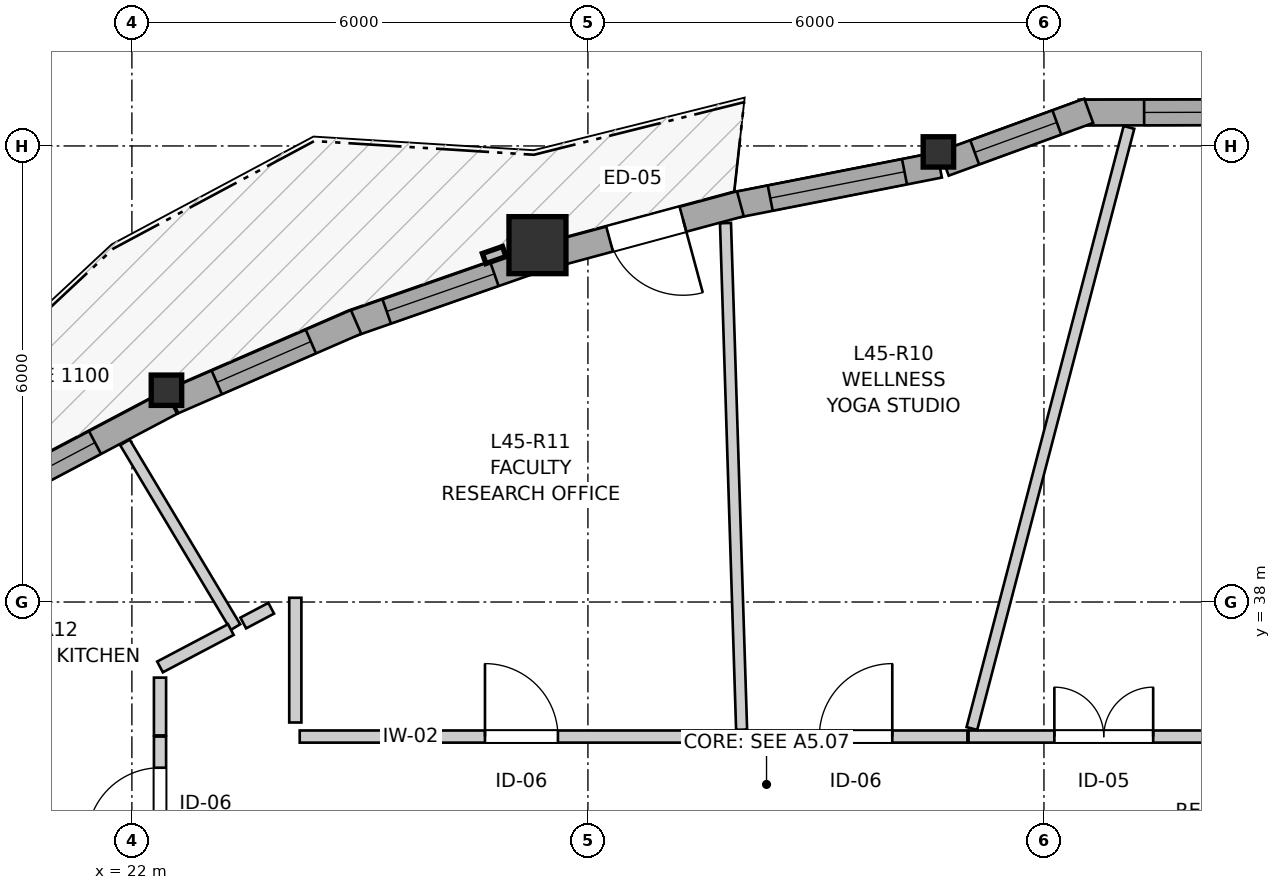
"""IFC4 building model, lengths in metres.
Left out: names, types, materials, properties, quantities, classifications, styles, units other than length and angle.
Written with IfcOpenShell. Run it as: python <this file> out.ifc"""

import sys

from ifc_helpers import new_model, si_unit, direction, frame, frame_2d, origin, origin_2d, place, context, subcontext, project, spatial, rectangle, i_section, extrude, source, transform, mapped, element, fill, save


model = new_model("IFC4")
c1 = context("Model", 3, precision=1e-05, world=origin(), true_north=direction((0.0, 1.0)))
c2 = subcontext(c1, "Body", "Model", "MODEL_VIEW")
j1 = project(units=[si_unit("LENGTHUNIT", "METRE"), si_unit("PLANEANGLEUNIT", "RADIAN")], contexts=[c1])
p1 = place(None, origin())
s1 = spatial("IfcSite", under=j1, at=p1, CompositionType="ELEMENT")
p2 = place(p1, origin())
s2 = spatial("IfcBuilding", under=s1, at=p2, CompositionType="ELEMENT")
p3 = place(p2, frame((0.0, 0.0, 152.2)))
s3 = spatial("IfcBuildingStorey", under=s2, at=p3, CompositionType="ELEMENT", Elevation=152.2)
m1 = source(origin(), c2, "Body", "SweptSolid", [
    extrude(i_section(OverallWidth=0.401, OverallDepth=0.399, WebThickness=0.023, FlangeThickness=0.036, FilletRadius=0.015, at=origin_2d()), origin(), (0.0, 0.0, 1.0), 2.935),
])
p4 = place(p3, frame((32.611, 43.922, 0.0), z_axis=(0.0, 0.0, 1.0), x_axis=(1.0, 0.0, 0.0)))
e1 = element("IfcColumn", 1, at=p4, inside=s3, PredefinedType="PILASTER", context=c2, shape_type="MappedRepresentation", body=[
    mapped(m1, transform((0.0, 0.0, 0.0), x_axis=(1.0, 0.0, 0.0), y_axis=(0.0, 1.0, 0.0), z_axis=(0.0, 0.0, 1.0), scale=1.0)),
])
m2 = source(origin(), c2, "Body", "SweptSolid", [
    extrude(rectangle(XDim=0.75, YDim=0.75, at=origin_2d()), origin(), (0.0, 0.0, 1.0), 2.935),
])
p5 = place(p3, frame((27.336, 42.695, 0.0), z_axis=(0.0, 0.0, 1.0), x_axis=(1.0, 0.0, 0.0)))
e2 = element("IfcColumn", 2, at=p5, inside=s3, PredefinedType="COLUMN", context=c2, shape_type="MappedRepresentation", body=[
    mapped(m2, transform((0.0, 0.0, 0.0), x_axis=(1.0, 0.0, 0.0), y_axis=(0.0, 1.0, 0.0), z_axis=(0.0, 0.0, 1.0), scale=1.0)),
])
p6 = place(p3, frame((22.455, 40.786, 0.0), z_axis=(0.0, 0.0, 1.0), x_axis=(1.0, 0.0, 0.0)))
e3 = element("IfcColumn", 3, at=p6, inside=s3, PredefinedType="PILASTER", context=c2, shape_type="MappedRepresentation", body=[
    mapped(m1, transform((0.0, 0.0, 0.0), x_axis=(1.0, 0.0, 0.0), y_axis=(0.0, 1.0, 0.0), z_axis=(0.0, 0.0, 1.0), scale=1.0)),
])
p7 = place(p3, frame((36.538, 44.444, 0.0), z_axis=(0.0, 0.0, 1.0), x_axis=(-0.999997247411, -0.002346309825, 0.0)))
e4 = element("IfcWall", 4, at=p7, inside=s3, PredefinedType="SOLIDWALL", context=c2, shape_type="SweptSolid", body=[
    extrude(rectangle(XDim=2.081, YDim=0.34, at=frame_2d((1.041, 0.0))), origin(), (0.0, 0.0, 1.0), 2.515),
])
p8 = place(p7, frame((0.271, 0.0, 0.82)))
e5 = element("IfcOpeningElement", 5, at=p8, cuts=e4, PredefinedType="OPENING", context=c2, shape_type="SweptSolid", body=[
    extrude(rectangle(XDim=0.95, YDim=1.35, at=frame_2d((0.475, 0.675))), frame((0.0, 0.18, 0.0), z_axis=(0.0, -1.0, 0.0), x_axis=(1.0, 0.0, 0.0)), (0.0, 0.0, 1.0), 0.36),
])
p9 = place(p3, frame((34.589, 44.462, 0.0), z_axis=(0.0, 0.0, 1.0), x_axis=(-0.939387553708, -0.342857148007, 0.0)))
e6 = element("IfcWall", 6, at=p9, inside=s3, PredefinedType="SOLIDWALL", context=c2, shape_type="SweptSolid", body=[
    extrude(rectangle(XDim=2.023, YDim=0.34, at=frame_2d((1.011, 0.0))), origin(), (0.0, 0.0, 1.0), 2.515),
])
p10 = place(p9, frame((0.447, 0.0, 0.82)))
e7 = element("IfcOpeningElement", 7, at=p10, cuts=e6, PredefinedType="OPENING", context=c2, shape_type="SweptSolid", body=[
    extrude(rectangle(XDim=1.15, YDim=1.2, at=frame_2d((0.575, 0.6))), frame((0.0, 0.18, 0.0), z_axis=(0.0, -1.0, 0.0), x_axis=(1.0, 0.0, 0.0)), (0.0, 0.0, 1.0), 0.36),
])
p11 = place(p3, frame((32.625, 43.751, 0.0), z_axis=(0.0, 0.0, 1.0), x_axis=(-0.981232663103, -0.192827541756, 0.0)))
e8 = element("IfcWall", 8, at=p11, inside=s3, PredefinedType="SOLIDWALL", context=c2, shape_type="SweptSolid", body=[
    extrude(rectangle(XDim=2.756, YDim=0.34, at=frame_2d((1.378, 0.0))), origin(), (0.0, 0.0, 1.0), 2.515),
])
p12 = place(p11, frame((0.468, 0.0, 0.82)))
e9 = element("IfcOpeningElement", 9, at=p12, cuts=e8, PredefinedType="OPENING", context=c2, shape_type="SweptSolid", body=[
    extrude(rectangle(XDim=1.8, YDim=1.45, at=frame_2d((0.9, 0.725))), frame((0.0, 0.18, 0.0), z_axis=(0.0, -1.0, 0.0), x_axis=(1.0, 0.0, 0.0)), (0.0, 0.0, 1.0), 0.36),
])
p13 = place(p3, frame((30.006, 43.24, 0.0), z_axis=(0.0, 0.0, 1.0), x_axis=(-0.965448248334, -0.260594857563, 0.0)))
e10 = element("IfcWall", 10, at=p13, inside=s3, PredefinedType="SOLIDWALL", context=c2, shape_type="SweptSolid", body=[
    extrude(rectangle(XDim=2.564, YDim=0.34, at=frame_2d((1.282, 0.0))), origin(), (0.0, 0.0, 1.0), 2.515),
])
p14 = place(p13, frame((0.782, 0.0, 0.0)))
e11 = element("IfcOpeningElement", 11, at=p14, cuts=e10, PredefinedType="OPENING", context=c2, shape_type="SweptSolid", body=[
    extrude(rectangle(XDim=1.0, YDim=2.1, at=frame_2d((0.5, 1.05))), frame((0.0, 0.18, 0.0), z_axis=(0.0, -1.0, 0.0), x_axis=(1.0, 0.0, 0.0)), (0.0, 0.0, 1.0), 0.36),
])
p15 = place(p3, frame((27.246, 42.483, 0.0), z_axis=(0.0, 0.0, 1.0), x_axis=(-0.944132901201, -0.32956496305, 0.0)))
e12 = element("IfcWall", 12, at=p15, inside=s3, PredefinedType="SOLIDWALL", context=c2, shape_type="SweptSolid", body=[
    extrude(rectangle(XDim=2.52, YDim=0.34, at=frame_2d((1.26, 0.0))), origin(), (0.0, 0.0, 1.0), 2.515),
])
p16 = place(p15, frame((0.505, 0.0, 0.82)))
e13 = element("IfcOpeningElement", 13, at=p16, cuts=e12, PredefinedType="OPENING", context=c2, shape_type="SweptSolid", body=[
    extrude(rectangle(XDim=1.5, YDim=1.45, at=frame_2d((0.75, 0.725))), frame((0.0, 0.18, 0.0), z_axis=(0.0, -1.0, 0.0), x_axis=(1.0, 0.0, 0.0)), (0.0, 0.0, 1.0), 0.36),
])
p17 = place(p3, frame((24.949, 41.685, 0.0), z_axis=(0.0, 0.0, 1.0), x_axis=(-0.917112921707, -0.398627506373, 0.0)))
e14 = element("IfcWall", 14, at=p17, inside=s3, PredefinedType="SOLIDWALL", context=c2, shape_type="SweptSolid", body=[
    extrude(rectangle(XDim=2.625, YDim=0.34, at=frame_2d((1.313, 0.0))), origin(), (0.0, 0.0, 1.0), 2.515),
])
p18 = place(p17, frame((0.648, 0.0, 0.82)))
e15 = element("IfcOpeningElement", 15, at=p18, cuts=e14, PredefinedType="OPENING", context=c2, shape_type="SweptSolid", body=[
    extrude(rectangle(XDim=1.35, YDim=1.45, at=frame_2d((0.675, 0.725))), frame((0.0, 0.18, 0.0), z_axis=(0.0, -1.0, 0.0), x_axis=(1.0, 0.0, 0.0)), (0.0, 0.0, 1.0), 0.36),
])
p19 = place(p3, frame((22.517, 40.627, 0.0), z_axis=(0.0, 0.0, 1.0), x_axis=(-0.884374030812, -0.466778934427, 0.0)))
e16 = element("IfcWall", 16, at=p19, inside=s3, PredefinedType="SOLIDWALL", context=c2, shape_type="SweptSolid", body=[
    extrude(rectangle(XDim=2.611, YDim=0.34, at=frame_2d((1.306, 0.0))), origin(), (0.0, 0.0, 1.0), 2.515),
])
p20 = place(p19, frame((1.133, 0.0, 0.82)))
e17 = element("IfcOpeningElement", 17, at=p20, cuts=e16, PredefinedType="OPENING", context=c2, shape_type="SweptSolid", body=[
    extrude(rectangle(XDim=1.05, YDim=1.45, at=frame_2d((0.525, 0.725))), frame((0.0, 0.18, 0.0), z_axis=(0.0, -1.0, 0.0), x_axis=(1.0, 0.0, 0.0)), (0.0, 0.0, 1.0), 0.36),
])
p21 = place(p3, frame((24.208, 36.23, 0.0), z_axis=(0.0, 0.0, 1.0), x_axis=(1.0, 0.0, 0.0)))
e18 = element("IfcWall", 18, at=p21, inside=s3, PredefinedType="PARTITIONING", context=c2, shape_type="SweptSolid", body=[
    extrude(rectangle(XDim=5.832, YDim=0.16, at=frame_2d((2.916, 0.0))), origin(), (0.0, 0.0, 1.0), 2.935),
])
p22 = place(p21, frame((2.438, 0.0, 0.0)))
e19 = element("IfcOpeningElement", 19, at=p22, cuts=e18, PredefinedType="OPENING", context=c2, shape_type="SweptSolid", body=[
    extrude(rectangle(XDim=0.96, YDim=2.1, at=frame_2d((0.48, 1.05))), frame((0.0, 0.09, 0.0), z_axis=(0.0, -1.0, 0.0), x_axis=(1.0, 0.0, 0.0)), (0.0, 0.0, 1.0), 0.18),
])
p23 = place(p3, frame((33.008, 36.23, 0.0), z_axis=(0.0, 0.0, 1.0), x_axis=(1.0, 0.0, 0.0)))
e20 = element("IfcWall", 20, at=p23, inside=s3, PredefinedType="PARTITIONING", context=c2, shape_type="SweptSolid", body=[
    extrude(rectangle(XDim=3.542, YDim=0.16, at=frame_2d((1.771, 0.0))), origin(), (0.0, 0.0, 1.0), 2.573),
])
p24 = place(p23, frame((1.129, 0.0, 0.0)))
e21 = element("IfcOpeningElement", 21, at=p24, cuts=e20, PredefinedType="OPENING", context=c2, shape_type="SweptSolid", body=[
    extrude(rectangle(XDim=1.3, YDim=2.1, at=frame_2d((0.65, 1.05))), frame((0.0, 0.09, 0.0), z_axis=(0.0, -1.0, 0.0), x_axis=(1.0, 0.0, 0.0)), (0.0, 0.0, 1.0), 0.18),
])
p25 = place(p3, frame((30.055, 36.23, 0.0), z_axis=(0.0, 0.0, 1.0), x_axis=(1.0, 0.0, 0.0)))
e22 = element("IfcWall", 22, at=p25, inside=s3, PredefinedType="PARTITIONING", context=c2, shape_type="SweptSolid", body=[
    extrude(rectangle(XDim=2.938, YDim=0.16, at=frame_2d((1.469, 0.0))), origin(), (0.0, 0.0, 1.0), 2.573),
])
p26 = place(p25, frame((0.99, 0.0, 0.0)))
e23 = element("IfcOpeningElement", 23, at=p26, cuts=e22, PredefinedType="OPENING", context=c2, shape_type="SweptSolid", body=[
    extrude(rectangle(XDim=0.96, YDim=2.1, at=frame_2d((0.48, 1.05))), frame((0.0, 0.09, 0.0), z_axis=(0.0, -1.0, 0.0), x_axis=(1.0, 0.0, 0.0)), (0.0, 0.0, 1.0), 0.18),
])
p27 = place(p3, frame((22.37, 34.45, 0.0), z_axis=(0.0, 0.0, 1.0), x_axis=(0.0, 1.0, 0.0)))
e24 = element("IfcWall", 24, at=p27, inside=s3, PredefinedType="PARTITIONING", context=c2, shape_type="SweptSolid", body=[
    extrude(rectangle(XDim=1.78, YDim=0.16, at=frame_2d((0.89, 0.0))), origin(), (0.0, 0.0, 1.0), 2.935),
])
p28 = place(p27, frame((0.41, 0.0, 0.0)))
e25 = element("IfcOpeningElement", 25, at=p28, cuts=e24, PredefinedType="OPENING", context=c2, shape_type="SweptSolid", body=[
    extrude(rectangle(XDim=0.96, YDim=2.1, at=frame_2d((0.48, 1.05))), frame((0.0, 0.09, 0.0), z_axis=(0.0, -1.0, 0.0), x_axis=(1.0, 0.0, 0.0)), (0.0, 0.0, 1.0), 0.18),
])
p29 = place(p3, frame((33.052, 36.336, 0.0), z_axis=(0.0, 0.0, 1.0), x_axis=(0.252838925964, 0.967508386277, 0.0)))
e26 = element("IfcWall", 26, at=p29, inside=s3, PredefinedType="PARTITIONING", context=c2, shape_type="SweptSolid", body=[
    extrude(rectangle(XDim=8.174, YDim=0.145, at=frame_2d((4.087, 0.0))), origin(), (0.0, 0.0, 1.0), 2.935),
])
p30 = place(p3, frame((29.81, 42.985, 0.0), z_axis=(0.0, 0.0, 1.0), x_axis=(0.031815387529, -0.99949376242, 0.0)))
e27 = element("IfcWall", 27, at=p30, inside=s3, PredefinedType="PARTITIONING", context=c2, shape_type="SweptSolid", body=[
    extrude(rectangle(XDim=6.668, YDim=0.145, at=frame_2d((3.334, 0.0))), origin(), (0.0, 0.0, 1.0), 2.935),
])
p31 = place(p3, frame((17.545, 37.432, 0.0), z_axis=(0.0, 0.0, 1.0), x_axis=(0.745965905636, -0.665984134668, 0.0)))
e28 = element("IfcWall", 28, at=p31, inside=s3, PredefinedType="PARTITIONING", context=c2, shape_type="SweptSolid", body=[
    extrude(rectangle(XDim=6.288, YDim=0.145, at=frame_2d((3.144, 0.0))), origin(), (0.0, 0.0, 1.0), 2.935),
])
p32 = place(p3, frame((21.908, 40.1, 0.0), z_axis=(0.0, 0.0, 1.0), x_axis=(0.513582752497, -0.85804006686, 0.0)))
e29 = element("IfcWall", 29, at=p32, inside=s3, PredefinedType="PARTITIONING", context=c2, shape_type="SweptSolid", body=[
    extrude(rectangle(XDim=2.832, YDim=0.145, at=frame_2d((1.416, 0.0))), origin(), (0.0, 0.0, 1.0), 2.935),
])
p33 = place(p3, frame((24.15, 36.415, 0.0), z_axis=(0.0, 0.0, 1.0), x_axis=(0.0, 1.0, 0.0)))
e30 = element("IfcWall", 30, at=p33, inside=s3, PredefinedType="PARTITIONING", context=c2, shape_type="SweptSolid", body=[
    extrude(rectangle(XDim=1.641, YDim=0.16, at=frame_2d((0.82, 0.0))), origin(), (0.0, 0.0, 1.0), 2.935),
])
p34 = place(p3, frame((22.37, 37.146, 0.0), z_axis=(0.0, 0.0, 1.0), x_axis=(0.884530854714, 0.46648168995, 0.0)))
e31 = element("IfcWall", 31, at=p34, inside=s3, PredefinedType="PARTITIONING", context=c2, shape_type="SweptSolid", body=[
    extrude(rectangle(XDim=1.053, YDim=0.16, at=frame_2d((0.527, 0.0))), origin(), (0.0, 0.0, 1.0), 2.543),
])
p35 = place(p3, frame((22.37, 36.245, 0.0), z_axis=(0.0, 0.0, 1.0), x_axis=(0.0, 1.0, 0.0)))
e32 = element("IfcWall", 32, at=p35, inside=s3, PredefinedType="PARTITIONING", context=c2, shape_type="SweptSolid", body=[
    extrude(rectangle(XDim=0.76, YDim=0.16, at=frame_2d((0.38, 0.0))), origin(), (0.0, 0.0, 1.0), 2.935),
])
p36 = place(p3, frame((23.465, 37.724, 0.0), z_axis=(0.0, 0.0, 1.0), x_axis=(0.884344349775, 0.466835164722, 0.0)))
e33 = element("IfcWall", 33, at=p36, inside=s3, PredefinedType="PARTITIONING", context=c2, shape_type="SweptSolid", body=[
    extrude(rectangle(XDim=0.416, YDim=0.16, at=frame_2d((0.208, 0.0))), origin(), (0.0, 0.0, 1.0), 2.543),
])
m3 = source(origin(), c2, "Body", "SweptSolid", [
    extrude(rectangle(XDim=0.95, YDim=1.35, at=frame_2d((0.475, 0.675))), frame((0.0, 0.03, 0.0), z_axis=(0.0, -1.0, 0.0), x_axis=(1.0, 0.0, 0.0)), (0.0, 0.0, 1.0), 0.06),
])
p37 = place(p8, origin())
e34 = element("IfcWindow", 34, at=p37, inside=s3, PartitioningType="SINGLE_PANEL", PredefinedType="WINDOW", context=c2, shape_type="MappedRepresentation", body=[
    mapped(m3, transform((0.0, 0.0, 0.0), x_axis=(1.0, 0.0, 0.0), y_axis=(0.0, 1.0, 0.0), z_axis=(0.0, 0.0, 1.0), scale=1.0)),
])
fill(e5, e34)
m4 = source(origin(), c2, "Body", "SweptSolid", [
    extrude(rectangle(XDim=1.15, YDim=1.2, at=frame_2d((0.575, 0.6))), frame((0.0, 0.03, 0.0), z_axis=(0.0, -1.0, 0.0), x_axis=(1.0, 0.0, 0.0)), (0.0, 0.0, 1.0), 0.06),
])
p38 = place(p10, origin())
e35 = element("IfcWindow", 35, at=p38, inside=s3, PartitioningType="SINGLE_PANEL", PredefinedType="WINDOW", context=c2, shape_type="MappedRepresentation", body=[
    mapped(m4, transform((0.0, 0.0, 0.0), x_axis=(1.0, 0.0, 0.0), y_axis=(0.0, 1.0, 0.0), z_axis=(0.0, 0.0, 1.0), scale=1.0)),
])
fill(e7, e35)
m5 = source(origin(), c2, "Body", "SweptSolid", [
    extrude(rectangle(XDim=1.8, YDim=1.45, at=frame_2d((0.9, 0.725))), frame((0.0, 0.03, 0.0), z_axis=(0.0, -1.0, 0.0), x_axis=(1.0, 0.0, 0.0)), (0.0, 0.0, 1.0), 0.06),
])
p39 = place(p12, origin())
e36 = element("IfcWindow", 36, at=p39, inside=s3, PartitioningType="SINGLE_PANEL", PredefinedType="WINDOW", context=c2, shape_type="MappedRepresentation", body=[
    mapped(m5, transform((0.0, 0.0, 0.0), x_axis=(1.0, 0.0, 0.0), y_axis=(0.0, 1.0, 0.0), z_axis=(0.0, 0.0, 1.0), scale=1.0)),
])
fill(e9, e36)
m6 = source(origin(), c2, "Body", "SweptSolid", [
    extrude(rectangle(XDim=1.5, YDim=1.45, at=frame_2d((0.75, 0.725))), frame((0.0, 0.03, 0.0), z_axis=(0.0, -1.0, 0.0), x_axis=(1.0, 0.0, 0.0)), (0.0, 0.0, 1.0), 0.06),
])
p40 = place(p16, origin())
e37 = element("IfcWindow", 37, at=p40, inside=s3, PartitioningType="SINGLE_PANEL", PredefinedType="WINDOW", context=c2, shape_type="MappedRepresentation", body=[
    mapped(m6, transform((0.0, 0.0, 0.0), x_axis=(1.0, 0.0, 0.0), y_axis=(0.0, 1.0, 0.0), z_axis=(0.0, 0.0, 1.0), scale=1.0)),
])
fill(e13, e37)
m7 = source(origin(), c2, "Body", "SweptSolid", [
    extrude(rectangle(XDim=1.35, YDim=1.45, at=frame_2d((0.675, 0.725))), frame((0.0, 0.03, 0.0), z_axis=(0.0, -1.0, 0.0), x_axis=(1.0, 0.0, 0.0)), (0.0, 0.0, 1.0), 0.06),
])
p41 = place(p18, origin())
e38 = element("IfcWindow", 38, at=p41, inside=s3, PartitioningType="SINGLE_PANEL", PredefinedType="WINDOW", context=c2, shape_type="MappedRepresentation", body=[
    mapped(m7, transform((0.0, 0.0, 0.0), x_axis=(1.0, 0.0, 0.0), y_axis=(0.0, 1.0, 0.0), z_axis=(0.0, 0.0, 1.0), scale=1.0)),
])
fill(e15, e38)
m8 = source(origin(), c2, "Body", "SweptSolid", [
    extrude(rectangle(XDim=1.05, YDim=1.45, at=frame_2d((0.525, 0.725))), frame((0.0, 0.03, 0.0), z_axis=(0.0, -1.0, 0.0), x_axis=(1.0, 0.0, 0.0)), (0.0, 0.0, 1.0), 0.06),
])
p42 = place(p20, origin())
e39 = element("IfcWindow", 39, at=p42, inside=s3, PartitioningType="SINGLE_PANEL", PredefinedType="WINDOW", context=c2, shape_type="MappedRepresentation", body=[
    mapped(m8, transform((0.0, 0.0, 0.0), x_axis=(1.0, 0.0, 0.0), y_axis=(0.0, 1.0, 0.0), z_axis=(0.0, 0.0, 1.0), scale=1.0)),
])
fill(e17, e39)
m9 = source(origin(), c2, "Body", "SweptSolid", [
    extrude(rectangle(XDim=1.0, YDim=2.1, at=frame_2d((0.5, 1.05))), frame((0.0, 0.025, 0.0), z_axis=(0.0, -1.0, 0.0), x_axis=(1.0, 0.0, 0.0)), (0.0, 0.0, 1.0), 0.05),
])
p43 = place(p14, origin())
e40 = element("IfcDoor", 40, at=p43, inside=s3, OperationType="SINGLE_SWING_LEFT", PredefinedType="DOOR", context=c2, shape_type="MappedRepresentation", body=[
    mapped(m9, transform((0.0, 0.0, 0.0), x_axis=(1.0, 0.0, 0.0), y_axis=(0.0, 1.0, 0.0), z_axis=(0.0, 0.0, 1.0), scale=1.0)),
])
fill(e11, e40)
m10 = source(origin(), c2, "Body", "SweptSolid", [
    extrude(rectangle(XDim=0.96, YDim=2.1, at=frame_2d((0.48, 1.05))), frame((0.0, 0.025, 0.0), z_axis=(0.0, -1.0, 0.0), x_axis=(1.0, 0.0, 0.0)), (0.0, 0.0, 1.0), 0.05),
])
p44 = place(p22, origin())
e41 = element("IfcDoor", 41, at=p44, inside=s3, OperationType="SINGLE_SWING_LEFT", PredefinedType="DOOR", context=c2, shape_type="MappedRepresentation", body=[
    mapped(m10, transform((0.0, 0.0, 0.0), x_axis=(1.0, 0.0, 0.0), y_axis=(0.0, 1.0, 0.0), z_axis=(0.0, 0.0, 1.0), scale=1.0)),
])
fill(e19, e41)
m11 = source(origin(), c2, "Body", "SweptSolid", [
    extrude(rectangle(XDim=1.3, YDim=2.1, at=frame_2d((0.65, 1.05))), frame((0.0, 0.025, 0.0), z_axis=(0.0, -1.0, 0.0), x_axis=(1.0, 0.0, 0.0)), (0.0, 0.0, 1.0), 0.05),
])
p45 = place(p24, origin())
e42 = element("IfcDoor", 42, at=p45, inside=s3, OperationType="DOUBLE_DOOR_SINGLE_SWING", PredefinedType="DOOR", context=c2, shape_type="MappedRepresentation", body=[
    mapped(m11, transform((0.0, 0.0, 0.0), x_axis=(1.0, 0.0, 0.0), y_axis=(0.0, 1.0, 0.0), z_axis=(0.0, 0.0, 1.0), scale=1.0)),
])
fill(e21, e42)
p46 = place(p26, origin())
e43 = element("IfcDoor", 43, at=p46, inside=s3, OperationType="SINGLE_SWING_RIGHT", PredefinedType="DOOR", context=c2, shape_type="MappedRepresentation", body=[
    mapped(m10, transform((0.0, 0.0, 0.0), x_axis=(1.0, 0.0, 0.0), y_axis=(0.0, 1.0, 0.0), z_axis=(0.0, 0.0, 1.0), scale=1.0)),
])
fill(e23, e43)
p47 = place(p28, origin())
e44 = element("IfcDoor", 44, at=p47, inside=s3, OperationType="SINGLE_SWING_LEFT", PredefinedType="DOOR", context=c2, shape_type="MappedRepresentation", body=[
    mapped(m10, transform((0.0, 0.0, 0.0), x_axis=(1.0, 0.0, 0.0), y_axis=(0.0, 1.0, 0.0), z_axis=(0.0, 0.0, 1.0), scale=1.0)),
])
fill(e25, e44)
save(model, sys.argv[1])
